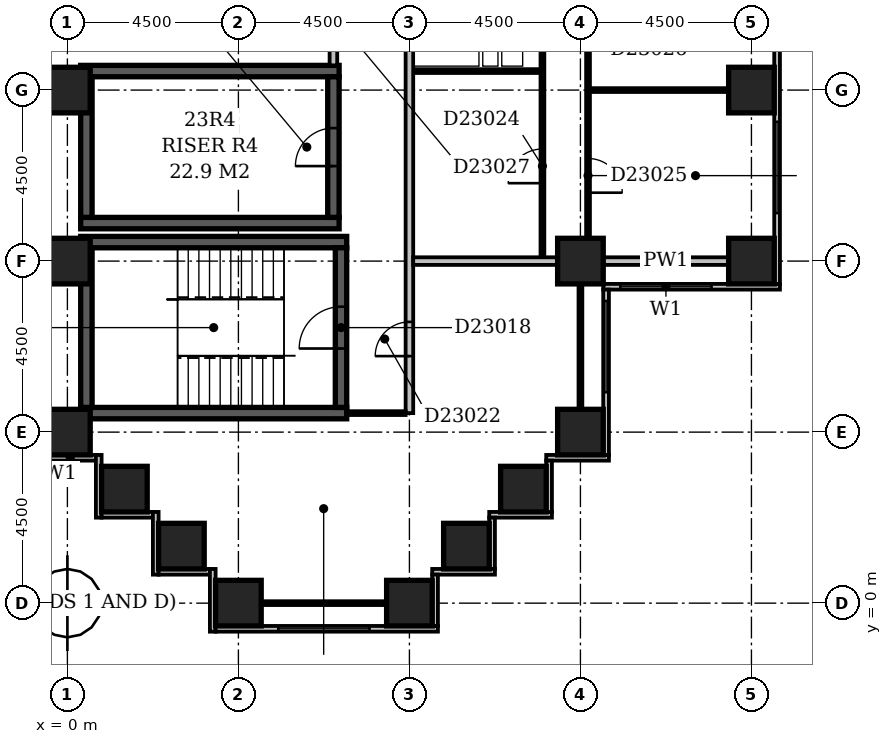
"""IFC4 building model, lengths in metres.
Left out: names, types, materials, properties, quantities, classifications, styles, units other than length and angle.
Written with IfcOpenShell. Run it as: python <this file> out.ifc"""

import sys

from ifc_helpers import new_model, si_unit, direction, frame, frame_2d, origin, origin_2d, place, context, subcontext, project, spatial, rectangle, extrude, element, fill, save


model = new_model("IFC4")
c1 = context("Model", 3, precision=1e-05, world=origin(), true_north=direction((0.0, 1.0)))
c2 = subcontext(c1, "Body", "Model", "MODEL_VIEW")
j1 = project(units=[si_unit("LENGTHUNIT", "METRE"), si_unit("PLANEANGLEUNIT", "RADIAN")], contexts=[c1])
p1 = place(None, origin())
s1 = spatial("IfcSite", under=j1, at=p1, CompositionType="ELEMENT")
p2 = place(p1, origin())
s2 = spatial("IfcBuilding", under=s1, at=p2, CompositionType="ELEMENT")
p3 = place(p2, frame((0.0, 0.0, 93.8)))
s3 = spatial("IfcBuildingStorey", under=s2, at=p3, CompositionType="ELEMENT", Elevation=93.8)
for number, where, z_axis, x_axis in (
    (1, (0.35, 5.0, -0.3), (0.0, 0.0, 1.0), (1.0, 0.0, 0.0)),
    (2, (0.35, 9.5, -0.3), (0.0, 0.0, 1.0), (1.0, 0.0, 0.0)),
):
    element("IfcWall", number, at=place(p3, frame(where, z_axis=z_axis, x_axis=x_axis)), inside=s3, PredefinedType="SHEAR", context=c2, shape_type="SweptSolid", body=[
        extrude(rectangle(XDim=7.0, YDim=0.3, at=frame_2d((3.5, 0.0))), origin(), (0.0, 0.0, 1.0), 3.6),
    ])
for number, where, z_axis, x_axis in (
    (3, (0.35, 10.0, -0.3), (0.0, 0.0, 1.0), (1.0, 0.0, 0.0)),
    (4, (0.35, 14.0, -0.3), (0.0, 0.0, 1.0), (1.0, 0.0, 0.0)),
):
    element("IfcWall", number, at=place(p3, frame(where, z_axis=z_axis, x_axis=x_axis)), inside=s3, PredefinedType="SHEAR", context=c2, shape_type="SweptSolid", body=[
        extrude(rectangle(XDim=6.8, YDim=0.3, at=frame_2d((3.4, 0.0))), origin(), (0.0, 0.0, 1.0), 3.6),
    ])
p4 = place(p3, frame((0.5, 5.15, -0.3), z_axis=(0.0, 0.0, 1.0), x_axis=(0.0, 1.0, 0.0)))
e5 = element("IfcWall", 5, at=p4, inside=s3, PredefinedType="SHEAR", context=c2, shape_type="SweptSolid", body=[
    extrude(rectangle(XDim=4.2, YDim=0.3, at=frame_2d((2.1, 0.0))), origin(), (0.0, 0.0, 1.0), 3.6),
])
p5 = place(p3, frame((0.5, 10.15, -0.3), z_axis=(0.0, 0.0, 1.0), x_axis=(0.0, 1.0, 0.0)))
e6 = element("IfcWall", 6, at=p5, inside=s3, PredefinedType="SHEAR", context=c2, shape_type="SweptSolid", body=[
    extrude(rectangle(XDim=3.7, YDim=0.3, at=frame_2d((1.85, 0.0))), origin(), (0.0, 0.0, 1.0), 3.6),
])
p6 = place(p3, frame((7.0, 10.15, -0.3), z_axis=(0.0, 0.0, 1.0), x_axis=(0.0, 1.0, 0.0)))
e7 = element("IfcWall", 7, at=p6, inside=s3, PredefinedType="SHEAR", context=c2, shape_type="SweptSolid", body=[
    extrude(rectangle(XDim=3.7, YDim=0.3, at=frame_2d((1.85, 0.0))), origin(), (0.0, 0.0, 1.0), 3.6),
])
p7 = place(p6, frame((1.35, 0.0, 0.3)))
e8 = element("IfcOpeningElement", 8, at=p7, cuts=e7, PredefinedType="OPENING", context=c2, shape_type="SweptSolid", body=[
    extrude(rectangle(XDim=1.0, YDim=2.1, at=frame_2d((0.5, 1.05))), frame((0.0, 0.162, 0.0), z_axis=(0.0, -1.0, 0.0), x_axis=(1.0, 0.0, 0.0)), (0.0, 0.0, 1.0), 0.324),
])
p8 = place(p3, frame((7.2, 5.15, -0.3), z_axis=(0.0, 0.0, 1.0), x_axis=(0.0, 1.0, 0.0)))
e9 = element("IfcWall", 9, at=p8, inside=s3, PredefinedType="SHEAR", context=c2, shape_type="SweptSolid", body=[
    extrude(rectangle(XDim=4.2, YDim=0.3, at=frame_2d((2.1, 0.0))), origin(), (0.0, 0.0, 1.0), 3.6),
])
p9 = place(p8, frame((1.55, 0.0, 0.3)))
e10 = element("IfcOpeningElement", 10, at=p9, cuts=e9, PredefinedType="OPENING", context=c2, shape_type="SweptSolid", body=[
    extrude(rectangle(XDim=1.1, YDim=2.1, at=frame_2d((0.55, 1.05))), frame((0.0, 0.162, 0.0), z_axis=(0.0, -1.0, 0.0), x_axis=(1.0, 0.0, 0.0)), (0.0, 0.0, 1.0), 0.324),
])
for number, where, z_axis, x_axis in (
    (11, (4.5, 0.0, -0.3), (0.0, 0.0, 1.0), (1.0, 0.0, 0.0)),
    (12, (9.0, 0.0, -0.3), (0.0, 0.0, 1.0), (1.0, 0.0, 0.0)),
    (13, (3.0, 1.5, -0.3), (0.0, 0.0, 1.0), (1.0, 0.0, 0.0)),
    (14, (10.5, 1.5, -0.3), (0.0, 0.0, 1.0), (1.0, 0.0, 0.0)),
    (15, (1.5, 3.0, -0.3), (0.0, 0.0, 1.0), (1.0, 0.0, 0.0)),
    (16, (12.0, 3.0, -0.3), (0.0, 0.0, 1.0), (1.0, 0.0, 0.0)),
    (17, (0.0, 4.5, -0.3), (0.0, 0.0, 1.0), (1.0, 0.0, 0.0)),
    (18, (13.5, 4.5, -0.3), (0.0, 0.0, 1.0), (1.0, 0.0, 0.0)),
    (19, (0.0, 9.0, -0.3), (0.0, 0.0, 1.0), (1.0, 0.0, 0.0)),
    (20, (13.5, 9.0, -0.3), (0.0, 0.0, 1.0), (1.0, 0.0, 0.0)),
    (21, (18.0, 9.0, -0.3), (0.0, 0.0, 1.0), (1.0, 0.0, 0.0)),
    (22, (0.0, 13.5, -0.3), (0.0, 0.0, 1.0), (1.0, 0.0, 0.0)),
    (23, (18.0, 13.5, -0.3), (0.0, 0.0, 1.0), (1.0, 0.0, 0.0)),
):
    element("IfcColumn", number, at=place(p3, frame(where, z_axis=z_axis, x_axis=x_axis)), inside=s3, PredefinedType="COLUMN", context=c2, shape_type="SweptSolid", body=[
        extrude(rectangle(XDim=1.2, YDim=1.2, at=origin_2d()), origin(), (0.0, 0.0, 1.0), 3.6),
    ])
p10 = place(p3, frame((9.675, -0.6, 0.0), z_axis=(0.0, 0.0, 1.0), x_axis=(0.0, 1.0, 0.0)))
e24 = element("IfcWall", 24, at=p10, inside=s3, PredefinedType="STANDARD", context=c2, shape_type="SweptSolid", body=[
    extrude(rectangle(XDim=1.35, YDim=0.15, at=frame_2d((0.675, 0.0))), origin(), (0.0, 0.0, 1.0), 2.7),
])
p11 = place(p3, frame((9.6, 0.825, 0.0), z_axis=(0.0, 0.0, 1.0), x_axis=(1.0, 0.0, 0.0)))
e25 = element("IfcWall", 25, at=p11, inside=s3, PredefinedType="STANDARD", context=c2, shape_type="SweptSolid", body=[
    extrude(rectangle(XDim=1.65, YDim=0.15, at=frame_2d((0.825, 0.0))), origin(), (0.0, 0.0, 1.0), 2.7),
])
p12 = place(p3, frame((11.175, 0.9, 0.0), z_axis=(0.0, 0.0, 1.0), x_axis=(0.0, 1.0, 0.0)))
e26 = element("IfcWall", 26, at=p12, inside=s3, PredefinedType="STANDARD", context=c2, shape_type="SweptSolid", body=[
    extrude(rectangle(XDim=1.35, YDim=0.15, at=frame_2d((0.675, 0.0))), origin(), (0.0, 0.0, 1.0), 2.7),
])
p13 = place(p3, frame((11.1, 2.325, 0.0), z_axis=(0.0, 0.0, 1.0), x_axis=(1.0, 0.0, 0.0)))
e27 = element("IfcWall", 27, at=p13, inside=s3, PredefinedType="STANDARD", context=c2, shape_type="SweptSolid", body=[
    extrude(rectangle(XDim=1.65, YDim=0.15, at=frame_2d((0.825, 0.0))), origin(), (0.0, 0.0, 1.0), 2.7),
])
p14 = place(p3, frame((12.675, 2.4, 0.0), z_axis=(0.0, 0.0, 1.0), x_axis=(0.0, 1.0, 0.0)))
e28 = element("IfcWall", 28, at=p14, inside=s3, PredefinedType="STANDARD", context=c2, shape_type="SweptSolid", body=[
    extrude(rectangle(XDim=1.35, YDim=0.15, at=frame_2d((0.675, 0.0))), origin(), (0.0, 0.0, 1.0), 2.7),
])
p15 = place(p3, frame((12.6, 3.825, 0.0), z_axis=(0.0, 0.0, 1.0), x_axis=(1.0, 0.0, 0.0)))
e29 = element("IfcWall", 29, at=p15, inside=s3, PredefinedType="STANDARD", context=c2, shape_type="SweptSolid", body=[
    extrude(rectangle(XDim=1.65, YDim=0.15, at=frame_2d((0.825, 0.0))), origin(), (0.0, 0.0, 1.0), 2.7),
])
p16 = place(p3, frame((14.175, 3.9, 0.0), z_axis=(0.0, 0.0, 1.0), x_axis=(0.0, 1.0, 0.0)))
e30 = element("IfcWall", 30, at=p16, inside=s3, PredefinedType="STANDARD", context=c2, shape_type="SweptSolid", body=[
    extrude(rectangle(XDim=4.35, YDim=0.15, at=frame_2d((2.175, 0.0))), origin(), (0.0, 0.0, 1.0), 2.7),
])
p17 = place(p16, frame((1.65, 0.0, 0.6)))
e31 = element("IfcOpeningElement", 31, at=p17, cuts=e30, PredefinedType="OPENING", context=c2, shape_type="SweptSolid", body=[
    extrude(rectangle(XDim=2.4, YDim=1.8, at=frame_2d((1.2, 0.9))), frame((0.0, 0.087, 0.0), z_axis=(0.0, -1.0, 0.0), x_axis=(1.0, 0.0, 0.0)), (0.0, 0.0, 1.0), 0.174),
])
p18 = place(p3, frame((14.1, 8.325, 0.0), z_axis=(0.0, 0.0, 1.0), x_axis=(1.0, 0.0, 0.0)))
e32 = element("IfcWall", 32, at=p18, inside=s3, PredefinedType="STANDARD", context=c2, shape_type="SweptSolid", body=[
    extrude(rectangle(XDim=4.65, YDim=0.15, at=frame_2d((2.325, 0.0))), origin(), (0.0, 0.0, 1.0), 2.7),
])
p19 = place(p18, frame((0.45, 0.0, 0.6)))
e33 = element("IfcOpeningElement", 33, at=p19, cuts=e32, PredefinedType="OPENING", context=c2, shape_type="SweptSolid", body=[
    extrude(rectangle(XDim=2.4, YDim=1.8, at=frame_2d((1.2, 0.9))), frame((0.0, 0.087, 0.0), z_axis=(0.0, -1.0, 0.0), x_axis=(1.0, 0.0, 0.0)), (0.0, 0.0, 1.0), 0.174),
])
p20 = place(p3, frame((18.675, 8.4, 0.0), z_axis=(0.0, 0.0, 1.0), x_axis=(0.0, 1.0, 0.0)))
e34 = element("IfcWall", 34, at=p20, inside=s3, PredefinedType="STANDARD", context=c2, shape_type="SweptSolid", body=[
    extrude(rectangle(XDim=8.85, YDim=0.15, at=frame_2d((4.425, 0.0))), origin(), (0.0, 0.0, 1.0), 2.7),
])
p21 = place(p20, frame((1.865, 0.0, 0.6)))
e35 = element("IfcOpeningElement", 35, at=p21, cuts=e34, PredefinedType="OPENING", context=c2, shape_type="SweptSolid", body=[
    extrude(rectangle(XDim=2.4, YDim=1.8, at=frame_2d((1.2, 0.9))), frame((0.0, 0.087, 0.0), z_axis=(0.0, -1.0, 0.0), x_axis=(1.0, 0.0, 0.0)), (0.0, 0.0, 1.0), 0.174),
])
p22 = place(p20, frame((6.15, 0.0, 0.6)))
e36 = element("IfcOpeningElement", 36, at=p22, cuts=e34, PredefinedType="OPENING", context=c2, shape_type="SweptSolid", body=[
    extrude(rectangle(XDim=2.4, YDim=1.8, at=frame_2d((1.2, 0.9))), frame((0.0, 0.087, 0.0), z_axis=(0.0, -1.0, 0.0), x_axis=(1.0, 0.0, 0.0)), (0.0, 0.0, 1.0), 0.174),
])
p23 = place(p3, frame((-0.6, 3.825, 0.0), z_axis=(0.0, 0.0, 1.0), x_axis=(1.0, 0.0, 0.0)))
e37 = element("IfcWall", 37, at=p23, inside=s3, PredefinedType="STANDARD", context=c2, shape_type="SweptSolid", body=[
    extrude(rectangle(XDim=1.35, YDim=0.15, at=frame_2d((0.675, 0.0))), origin(), (0.0, 0.0, 1.0), 2.7),
])
p24 = place(p3, frame((0.825, 3.9, 0.0), z_axis=(0.0, 0.0, 1.0), x_axis=(0.0, -1.0, 0.0)))
e38 = element("IfcWall", 38, at=p24, inside=s3, PredefinedType="STANDARD", context=c2, shape_type="SweptSolid", body=[
    extrude(rectangle(XDim=1.65, YDim=0.15, at=frame_2d((0.825, 0.0))), origin(), (0.0, 0.0, 1.0), 2.7),
])
p25 = place(p3, frame((0.9, 2.325, 0.0), z_axis=(0.0, 0.0, 1.0), x_axis=(1.0, 0.0, 0.0)))
e39 = element("IfcWall", 39, at=p25, inside=s3, PredefinedType="STANDARD", context=c2, shape_type="SweptSolid", body=[
    extrude(rectangle(XDim=1.35, YDim=0.15, at=frame_2d((0.675, 0.0))), origin(), (0.0, 0.0, 1.0), 2.7),
])
p26 = place(p3, frame((2.325, 2.4, 0.0), z_axis=(0.0, 0.0, 1.0), x_axis=(0.0, -1.0, 0.0)))
e40 = element("IfcWall", 40, at=p26, inside=s3, PredefinedType="STANDARD", context=c2, shape_type="SweptSolid", body=[
    extrude(rectangle(XDim=1.65, YDim=0.15, at=frame_2d((0.825, 0.0))), origin(), (0.0, 0.0, 1.0), 2.7),
])
p27 = place(p3, frame((2.4, 0.825, 0.0), z_axis=(0.0, 0.0, 1.0), x_axis=(1.0, 0.0, 0.0)))
e41 = element("IfcWall", 41, at=p27, inside=s3, PredefinedType="STANDARD", context=c2, shape_type="SweptSolid", body=[
    extrude(rectangle(XDim=1.35, YDim=0.15, at=frame_2d((0.675, 0.0))), origin(), (0.0, 0.0, 1.0), 2.7),
])
p28 = place(p3, frame((3.825, 0.9, 0.0), z_axis=(0.0, 0.0, 1.0), x_axis=(0.0, -1.0, 0.0)))
e42 = element("IfcWall", 42, at=p28, inside=s3, PredefinedType="STANDARD", context=c2, shape_type="SweptSolid", body=[
    extrude(rectangle(XDim=1.65, YDim=0.15, at=frame_2d((0.825, 0.0))), origin(), (0.0, 0.0, 1.0), 2.7),
])
p29 = place(p3, frame((3.9, -0.675, 0.0), z_axis=(0.0, 0.0, 1.0), x_axis=(1.0, 0.0, 0.0)))
e43 = element("IfcWall", 43, at=p29, inside=s3, PredefinedType="STANDARD", context=c2, shape_type="SweptSolid", body=[
    extrude(rectangle(XDim=5.85, YDim=0.15, at=frame_2d((2.925, 0.0))), origin(), (0.0, 0.0, 1.0), 2.7),
])
p30 = place(p29, frame((1.65, 0.0, 0.6)))
e44 = element("IfcOpeningElement", 44, at=p30, cuts=e43, PredefinedType="OPENING", context=c2, shape_type="SweptSolid", body=[
    extrude(rectangle(XDim=2.4, YDim=1.8, at=frame_2d((1.2, 0.9))), frame((0.0, 0.087, 0.0), z_axis=(0.0, -1.0, 0.0), x_axis=(1.0, 0.0, 0.0)), (0.0, 0.0, 1.0), 0.174),
])
p31 = place(p3, frame((5.1, 0.0, 0.0), z_axis=(0.0, 0.0, 1.0), x_axis=(1.0, 0.0, 0.0)))
e45 = element("IfcWall", 45, at=p31, inside=s3, PredefinedType="PARTITIONING", context=c2, shape_type="SweptSolid", body=[
    extrude(rectangle(XDim=3.3, YDim=0.1, at=frame_2d((1.65, 0.0))), origin(), (0.0, 0.0, 1.0), 2.7),
])
p32 = place(p3, frame((0.0, 4.4, 0.0), z_axis=(0.0, 0.0, 1.0), x_axis=(0.0, 1.0, 0.0)))
e46 = element("IfcWall", 46, at=p32, inside=s3, PredefinedType="PARTITIONING", context=c2, shape_type="SweptSolid", body=[
    extrude(rectangle(XDim=0.7, YDim=0.1, at=frame_2d((0.35, 0.0))), origin(), (0.0, 0.0, 1.0), 2.7),
])
p33 = place(p3, frame((7.349, 5.0, 0.0), z_axis=(0.0, 0.0, 1.0), x_axis=(1.0, 0.0, 0.0)))
e47 = element("IfcWall", 47, at=p33, inside=s3, PredefinedType="PARTITIONING", context=c2, shape_type="SweptSolid", body=[
    extrude(rectangle(XDim=1.551, YDim=0.1, at=frame_2d((0.775, 0.0))), origin(), (0.0, 0.0, 1.0), 3.3),
])
p34 = place(p3, frame((9.0, 5.0, 0.0), z_axis=(0.0, 0.0, 1.0), x_axis=(0.0, 1.0, 0.0)))
e48 = element("IfcWall", 48, at=p34, inside=s3, PredefinedType="PARTITIONING", context=c2, shape_type="SweptSolid", body=[
    extrude(rectangle(XDim=44.5, YDim=0.2, at=frame_2d((22.25, 0.0))), origin(), (0.0, 0.0, 1.0), 3.3),
])
p35 = place(p34, frame((18.4, 0.0, 0.0)))
e49 = element("IfcOpeningElement", 49, at=p35, cuts=e48, PredefinedType="OPENING", context=c2, shape_type="SweptSolid", body=[
    extrude(rectangle(XDim=1.0, YDim=2.1, at=frame_2d((0.5, 1.05))), frame((0.0, 0.112, 0.0), z_axis=(0.0, -1.0, 0.0), x_axis=(1.0, 0.0, 0.0)), (0.0, 0.0, 1.0), 0.224),
])
p36 = place(p34, frame((11.7, 0.0, 0.0)))
e50 = element("IfcOpeningElement", 50, at=p36, cuts=e48, PredefinedType="OPENING", context=c2, shape_type="SweptSolid", body=[
    extrude(rectangle(XDim=1.0, YDim=2.1, at=frame_2d((0.5, 1.05))), frame((0.0, 0.112, 0.0), z_axis=(0.0, -1.0, 0.0), x_axis=(1.0, 0.0, 0.0)), (0.0, 0.0, 1.0), 0.224),
])
p37 = place(p34, frame((37.25, 0.0, 0.0)))
e51 = element("IfcOpeningElement", 51, at=p37, cuts=e48, PredefinedType="OPENING", context=c2, shape_type="SweptSolid", body=[
    extrude(rectangle(XDim=0.9, YDim=2.1, at=frame_2d((0.45, 1.05))), frame((0.0, 0.112, 0.0), z_axis=(0.0, -1.0, 0.0), x_axis=(1.0, 0.0, 0.0)), (0.0, 0.0, 1.0), 0.224),
])
p38 = place(p34, frame((1.5, 0.0, 0.0)))
e52 = element("IfcOpeningElement", 52, at=p38, cuts=e48, PredefinedType="OPENING", context=c2, shape_type="SweptSolid", body=[
    extrude(rectangle(XDim=0.9, YDim=2.1, at=frame_2d((0.45, 1.05))), frame((0.0, 0.112, 0.0), z_axis=(0.0, -1.0, 0.0), x_axis=(1.0, 0.0, 0.0)), (0.0, 0.0, 1.0), 0.224),
])
p39 = place(p3, frame((13.5, 5.1, 0.0), z_axis=(0.0, 0.0, 1.0), x_axis=(0.0, 1.0, 0.0)))
e53 = element("IfcWall", 53, at=p39, inside=s3, PredefinedType="PARTITIONING", context=c2, shape_type="SweptSolid", body=[
    extrude(rectangle(XDim=3.3, YDim=0.1, at=frame_2d((1.65, 0.0))), origin(), (0.0, 0.0, 1.0), 2.7),
])
p40 = place(p3, frame((9.1, 9.0, 0.0), z_axis=(0.0, 0.0, 1.0), x_axis=(1.0, 0.0, 0.0)))
e54 = element("IfcWall", 54, at=p40, inside=s3, PredefinedType="PARTITIONING", context=c2, shape_type="SweptSolid", body=[
    extrude(rectangle(XDim=3.8, YDim=0.2, at=frame_2d((1.9, 0.0))), origin(), (0.0, 0.0, 1.0), 3.3),
])
p41 = place(p3, frame((14.1, 9.0, 0.0), z_axis=(0.0, 0.0, 1.0), x_axis=(1.0, 0.0, 0.0)))
e55 = element("IfcWall", 55, at=p41, inside=s3, PredefinedType="PARTITIONING", context=c2, shape_type="SweptSolid", body=[
    extrude(rectangle(XDim=3.3, YDim=0.2, at=frame_2d((1.65, 0.0))), origin(), (0.0, 0.0, 1.0), 2.7),
])
p42 = place(p3, frame((12.5, 9.1, 0.0), z_axis=(0.0, 0.0, 1.0), x_axis=(0.0, 1.0, 0.0)))
e56 = element("IfcWall", 56, at=p42, inside=s3, PredefinedType="PARTITIONING", context=c2, shape_type="SweptSolid", body=[
    extrude(rectangle(XDim=7.3, YDim=0.1, at=frame_2d((3.65, 0.0))), origin(), (0.0, 0.0, 1.0), 3.3),
])
p43 = place(p42, frame((5.7, 0.0, 0.0)))
e57 = element("IfcOpeningElement", 57, at=p43, cuts=e56, PredefinedType="OPENING", context=c2, shape_type="SweptSolid", body=[
    extrude(rectangle(XDim=0.8, YDim=2.1, at=frame_2d((0.4, 1.05))), frame((0.0, 0.062, 0.0), z_axis=(0.0, -1.0, 0.0), x_axis=(1.0, 0.0, 0.0)), (0.0, 0.0, 1.0), 0.124),
])
p44 = place(p42, frame((1.95, 0.0, 0.0)))
e58 = element("IfcOpeningElement", 58, at=p44, cuts=e56, PredefinedType="OPENING", context=c2, shape_type="SweptSolid", body=[
    extrude(rectangle(XDim=0.9, YDim=2.1, at=frame_2d((0.45, 1.05))), frame((0.0, 0.062, 0.0), z_axis=(0.0, -1.0, 0.0), x_axis=(1.0, 0.0, 0.0)), (0.0, 0.0, 1.0), 0.124),
])
p45 = place(p3, frame((13.7, 9.6, 0.0), z_axis=(0.0, 0.0, 1.0), x_axis=(0.0, 1.0, 0.0)))
e59 = element("IfcWall", 59, at=p45, inside=s3, PredefinedType="PARTITIONING", context=c2, shape_type="SweptSolid", body=[
    extrude(rectangle(XDim=8.3, YDim=0.1, at=frame_2d((4.15, 0.0))), origin(), (0.0, 0.0, 1.0), 3.3),
])
p46 = place(p45, frame((1.2, 0.0, 0.0)))
e60 = element("IfcOpeningElement", 60, at=p46, cuts=e59, PredefinedType="OPENING", context=c2, shape_type="SweptSolid", body=[
    extrude(rectangle(XDim=0.9, YDim=2.1, at=frame_2d((0.45, 1.05))), frame((0.0, 0.062, 0.0), z_axis=(0.0, -1.0, 0.0), x_axis=(1.0, 0.0, 0.0)), (0.0, 0.0, 1.0), 0.124),
])
p47 = place(p45, frame((5.7, 0.0, 0.0)))
e61 = element("IfcOpeningElement", 61, at=p47, cuts=e59, PredefinedType="OPENING", context=c2, shape_type="SweptSolid", body=[
    extrude(rectangle(XDim=0.9, YDim=2.1, at=frame_2d((0.45, 1.05))), frame((0.0, 0.062, 0.0), z_axis=(0.0, -1.0, 0.0), x_axis=(1.0, 0.0, 0.0)), (0.0, 0.0, 1.0), 0.124),
])
p48 = place(p3, frame((13.75, 13.5, 0.0), z_axis=(0.0, 0.0, 1.0), x_axis=(1.0, 0.0, 0.0)))
e62 = element("IfcWall", 62, at=p48, inside=s3, PredefinedType="PARTITIONING", context=c2, shape_type="SweptSolid", body=[
    extrude(rectangle(XDim=3.65, YDim=0.1, at=frame_2d((1.825, 0.0))), origin(), (0.0, 0.0, 1.0), 3.3),
])
p49 = place(p3, frame((9.1, 14.0, 0.0), z_axis=(0.0, 0.0, 1.0), x_axis=(1.0, 0.0, 0.0)))
e63 = element("IfcWall", 63, at=p49, inside=s3, PredefinedType="PLUMBINGWALL", context=c2, shape_type="SweptSolid", body=[
    extrude(rectangle(XDim=3.35, YDim=0.1, at=frame_2d((1.675, 0.0))), origin(), (0.0, 0.0, 1.0), 3.3),
])
p50 = place(p3, frame((7.0, 14.15, 0.0), z_axis=(0.0, 0.0, 1.0), x_axis=(0.0, 1.0, 0.0)))
e64 = element("IfcWall", 64, at=p50, inside=s3, PredefinedType="PARTITIONING", context=c2, shape_type="SweptSolid", body=[
    extrude(rectangle(XDim=4.2, YDim=0.2, at=frame_2d((2.1, 0.0))), origin(), (0.0, 0.0, 1.0), 3.3),
])
p51 = place(p50, frame((1.65, 0.0, 0.0)))
e65 = element("IfcOpeningElement", 65, at=p51, cuts=e64, PredefinedType="OPENING", context=c2, shape_type="SweptSolid", body=[
    extrude(rectangle(XDim=0.9, YDim=2.1, at=frame_2d((0.45, 1.05))), frame((0.0, 0.112, 0.0), z_axis=(0.0, -1.0, 0.0), x_axis=(1.0, 0.0, 0.0)), (0.0, 0.0, 1.0), 0.224),
])
p52 = place(p17, origin())
e66 = element("IfcWindow", 66, at=p52, inside=s3, PartitioningType="SINGLE_PANEL", PredefinedType="WINDOW", context=c2, shape_type="SweptSolid", body=[
    extrude(rectangle(XDim=2.4, YDim=1.8, at=frame_2d((1.2, 0.9))), frame((0.0, 0.03, 0.0), z_axis=(0.0, -1.0, 0.0), x_axis=(1.0, 0.0, 0.0)), (0.0, 0.0, 1.0), 0.06),
])
fill(e31, e66)
p53 = place(p19, origin())
e67 = element("IfcWindow", 67, at=p53, inside=s3, PartitioningType="SINGLE_PANEL", PredefinedType="WINDOW", context=c2, shape_type="SweptSolid", body=[
    extrude(rectangle(XDim=2.4, YDim=1.8, at=frame_2d((1.2, 0.9))), frame((0.0, 0.03, 0.0), z_axis=(0.0, -1.0, 0.0), x_axis=(1.0, 0.0, 0.0)), (0.0, 0.0, 1.0), 0.06),
])
fill(e33, e67)
p54 = place(p21, origin())
e68 = element("IfcWindow", 68, at=p54, inside=s3, PartitioningType="SINGLE_PANEL", PredefinedType="WINDOW", context=c2, shape_type="SweptSolid", body=[
    extrude(rectangle(XDim=2.4, YDim=1.8, at=frame_2d((1.2, 0.9))), frame((0.0, 0.03, 0.0), z_axis=(0.0, -1.0, 0.0), x_axis=(1.0, 0.0, 0.0)), (0.0, 0.0, 1.0), 0.06),
])
fill(e35, e68)
p55 = place(p30, origin())
e69 = element("IfcWindow", 69, at=p55, inside=s3, PartitioningType="SINGLE_PANEL", PredefinedType="WINDOW", context=c2, shape_type="SweptSolid", body=[
    extrude(rectangle(XDim=2.4, YDim=1.8, at=frame_2d((1.2, 0.9))), frame((0.0, 0.03, 0.0), z_axis=(0.0, -1.0, 0.0), x_axis=(1.0, 0.0, 0.0)), (0.0, 0.0, 1.0), 0.06),
])
fill(e44, e69)
p56 = place(p7, origin())
e70 = element("IfcDoor", 70, at=p56, inside=s3, OperationType="SINGLE_SWING_LEFT", PredefinedType="DOOR", context=c2, shape_type="SweptSolid", body=[
    extrude(rectangle(XDim=1.0, YDim=2.1, at=frame_2d((0.5, 1.05))), frame((0.0, 0.025, 0.0), z_axis=(0.0, -1.0, 0.0), x_axis=(1.0, 0.0, 0.0)), (0.0, 0.0, 1.0), 0.05),
])
fill(e8, e70)
p57 = place(p9, origin())
e71 = element("IfcDoor", 71, at=p57, inside=s3, OperationType="SINGLE_SWING_LEFT", PredefinedType="DOOR", context=c2, shape_type="SweptSolid", body=[
    extrude(rectangle(XDim=1.1, YDim=2.1, at=frame_2d((0.55, 1.05))), frame((0.0, 0.025, 0.0), z_axis=(0.0, -1.0, 0.0), x_axis=(1.0, 0.0, 0.0)), (0.0, 0.0, 1.0), 0.05),
])
fill(e10, e71)
p58 = place(p38, origin())
e72 = element("IfcDoor", 72, at=p58, inside=s3, OperationType="SINGLE_SWING_LEFT", PredefinedType="DOOR", context=c2, shape_type="SweptSolid", body=[
    extrude(rectangle(XDim=0.9, YDim=2.1, at=frame_2d((0.45, 1.05))), frame((0.0, 0.025, 0.0), z_axis=(0.0, -1.0, 0.0), x_axis=(1.0, 0.0, 0.0)), (0.0, 0.0, 1.0), 0.05),
])
fill(e52, e72)
p59 = place(p44, origin())
e73 = element("IfcDoor", 73, at=p59, inside=s3, OperationType="SINGLE_SWING_LEFT", PredefinedType="DOOR", context=c2, shape_type="SweptSolid", body=[
    extrude(rectangle(XDim=0.9, YDim=2.1, at=frame_2d((0.45, 1.05))), frame((0.0, 0.025, 0.0), z_axis=(0.0, -1.0, 0.0), x_axis=(1.0, 0.0, 0.0)), (0.0, 0.0, 1.0), 0.05),
])
fill(e58, e73)
p60 = place(p46, frame((0.9, 0.0, 0.0), z_axis=(0.0, 0.0, 1.0), x_axis=(-1.0, 0.0, 0.0)))
e74 = element("IfcDoor", 74, at=p60, inside=s3, OperationType="SINGLE_SWING_RIGHT", PredefinedType="DOOR", context=c2, shape_type="SweptSolid", body=[
    extrude(rectangle(XDim=0.9, YDim=2.1, at=frame_2d((0.45, 1.05))), frame((0.0, 0.025, 0.0), z_axis=(0.0, -1.0, 0.0), x_axis=(1.0, 0.0, 0.0)), (0.0, 0.0, 1.0), 0.05),
])
fill(e60, e74)
save(model, sys.argv[1])
